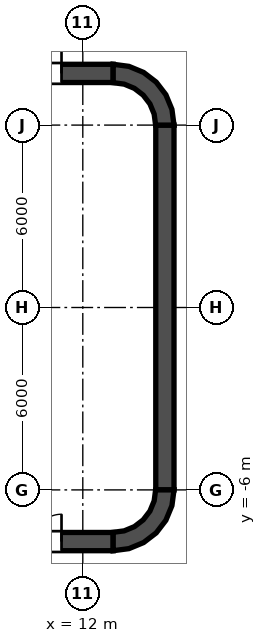
"""IFC4 building model, lengths in metres.
Left out: names, types, materials, properties, quantities, classifications, styles, units other than length and angle.
Written with IfcOpenShell. Run it as: python <this file> out.ifc"""

import sys

from ifc_helpers import new_model, si_unit, direction, frame, frame_2d, origin, place, context, subcontext, project, spatial, polyline, rectangle, outline, extrude, element, fill, save


model = new_model("IFC4")
c1 = context("Model", 3, precision=1e-05, world=origin(), true_north=direction((0.0, 1.0)))
c2 = subcontext(c1, "Body", "Model", "MODEL_VIEW")
j1 = project(units=[si_unit("LENGTHUNIT", "METRE"), si_unit("PLANEANGLEUNIT", "RADIAN")], contexts=[c1])
p1 = place(None, origin())
s1 = spatial("IfcSite", under=j1, at=p1, CompositionType="ELEMENT")
p2 = place(p1, origin())
s2 = spatial("IfcBuilding", under=s1, at=p2, CompositionType="ELEMENT")
p3 = place(p2, origin())
s3 = spatial("IfcBuildingStorey", under=s2, at=p3, CompositionType="ELEMENT", Elevation=0.0)
p4 = place(p3, frame((-13.0, 7.7, 0.0), z_axis=(0.0, 0.0, 1.0), x_axis=(1.0, 0.0, 0.0)))
e1 = element("IfcWall", 1, at=p4, inside=s3, PredefinedType="SHEAR", context=c2, shape_type="SweptSolid", body=[
    extrude(rectangle(XDim=26.0, YDim=0.6, at=frame_2d((13.0, 0.0))), origin(), (0.0, 0.0, 1.0), 8.0),
])
p5 = place(p4, frame((1.7, 0.0, 0.0)))
e2 = element("IfcOpeningElement", 2, at=p5, cuts=e1, PredefinedType="OPENING", context=c2, shape_type="SweptSolid", body=[
    extrude(rectangle(XDim=1.8, YDim=2.1, at=frame_2d((0.9, 1.05))), frame((0.0, 0.3, 0.0), z_axis=(0.0, -1.0, 0.0), x_axis=(1.0, 0.0, 0.0)), (0.0, 0.0, 1.0), 0.6),
])
p6 = place(p4, frame((22.5, 0.0, 0.0)))
e3 = element("IfcOpeningElement", 3, at=p6, cuts=e1, PredefinedType="OPENING", context=c2, shape_type="SweptSolid", body=[
    extrude(rectangle(XDim=1.8, YDim=2.1, at=frame_2d((0.9, 1.05))), frame((0.0, 0.3, 0.0), z_axis=(0.0, -1.0, 0.0), x_axis=(1.0, 0.0, 0.0)), (0.0, 0.0, 1.0), 0.6),
])
p7 = place(p3, frame((-13.0, -7.7, 0.0), z_axis=(0.0, 0.0, 1.0), x_axis=(1.0, 0.0, 0.0)))
e4 = element("IfcWall", 4, at=p7, inside=s3, PredefinedType="SHEAR", context=c2, shape_type="SweptSolid", body=[
    extrude(rectangle(XDim=26.0, YDim=0.6, at=frame_2d((13.0, 0.0))), origin(), (0.0, 0.0, 1.0), 8.0),
])
p8 = place(p7, frame((1.7, 0.0, 0.0)))
e5 = element("IfcOpeningElement", 5, at=p8, cuts=e4, PredefinedType="OPENING", context=c2, shape_type="SweptSolid", body=[
    extrude(rectangle(XDim=1.8, YDim=2.1, at=frame_2d((0.9, 1.05))), frame((0.0, 0.3, 0.0), z_axis=(0.0, -1.0, 0.0), x_axis=(1.0, 0.0, 0.0)), (0.0, 0.0, 1.0), 0.6),
])
p9 = place(p7, frame((22.5, 0.0, 0.0)))
e6 = element("IfcOpeningElement", 6, at=p9, cuts=e4, PredefinedType="OPENING", context=c2, shape_type="SweptSolid", body=[
    extrude(rectangle(XDim=1.8, YDim=2.1, at=frame_2d((0.9, 1.05))), frame((0.0, 0.3, 0.0), z_axis=(0.0, -1.0, 0.0), x_axis=(1.0, 0.0, 0.0)), (0.0, 0.0, 1.0), 0.6),
])
p10 = place(p3, frame((14.7, -6.0, 0.0), z_axis=(0.0, 0.0, 1.0), x_axis=(0.0, 1.0, 0.0)))
e7 = element("IfcWall", 7, at=p10, inside=s3, PredefinedType="SHEAR", context=c2, shape_type="SweptSolid", body=[
    extrude(rectangle(XDim=12.0, YDim=0.6, at=frame_2d((6.0, 0.0))), origin(), (0.0, 0.0, 1.0), 8.0),
])
p11 = place(p3, origin())
e8 = element("IfcWall", 8, at=p11, inside=s3, PredefinedType="SHEAR", context=c2, shape_type="SweptSolid", body=[
    extrude(outline(polyline([(13.0, 8.0), (13.0, 7.395), (13.361, 7.347), (13.698, 7.208), (13.986, 6.986), (14.208, 6.698), (14.347, 6.361), (14.395, 6.0), (15.0, 6.0), (14.932, 6.518), (14.732, 7.0), (14.414, 7.414), (14.0, 7.732), (13.518, 7.932), (13.0, 8.0)])), origin(), (0.0, 0.0, 1.0), 8.0),
])
e9 = element("IfcWall", 9, at=p11, inside=s3, PredefinedType="SHEAR", context=c2, shape_type="SweptSolid", body=[
    extrude(outline(polyline([(15.0, -6.0), (14.395, -6.0), (14.347, -6.361), (14.208, -6.698), (13.986, -6.986), (13.698, -7.208), (13.361, -7.347), (13.0, -7.395), (13.0, -8.0), (13.518, -7.932), (14.0, -7.732), (14.414, -7.414), (14.732, -7.0), (14.932, -6.518), (15.0, -6.0)])), origin(), (0.0, 0.0, 1.0), 8.0),
])
p12 = place(p3, frame((11.8, -7.4, 0.0), z_axis=(0.0, 0.0, 1.0), x_axis=(0.0, 1.0, 0.0)))
e10 = element("IfcWall", 10, at=p12, inside=s3, PredefinedType="SOLIDWALL", context=c2, shape_type="SweptSolid", body=[
    extrude(rectangle(XDim=14.8, YDim=0.4, at=frame_2d((7.4, 0.0))), origin(), (0.0, 0.0, 1.0), 7.8),
])
p13 = place(p12, frame((11.2, 0.0, 0.0)))
e11 = element("IfcOpeningElement", 11, at=p13, cuts=e10, PredefinedType="OPENING", context=c2, shape_type="SweptSolid", body=[
    extrude(rectangle(XDim=1.1, YDim=2.1, at=frame_2d((0.55, 1.05))), frame((0.0, 0.2, 0.0), z_axis=(0.0, -1.0, 0.0), x_axis=(1.0, 0.0, 0.0)), (0.0, 0.0, 1.0), 0.4),
])
p14 = place(p12, frame((8.3, 0.0, 0.0)))
e12 = element("IfcOpeningElement", 12, at=p14, cuts=e10, PredefinedType="OPENING", context=c2, shape_type="SweptSolid", body=[
    extrude(rectangle(XDim=1.1, YDim=2.1, at=frame_2d((0.55, 1.05))), frame((0.0, 0.2, 0.0), z_axis=(0.0, -1.0, 0.0), x_axis=(1.0, 0.0, 0.0)), (0.0, 0.0, 1.0), 0.4),
])
p15 = place(p12, frame((5.4, 0.0, 0.0)))
e13 = element("IfcOpeningElement", 13, at=p15, cuts=e10, PredefinedType="OPENING", context=c2, shape_type="SweptSolid", body=[
    extrude(rectangle(XDim=1.1, YDim=2.1, at=frame_2d((0.55, 1.05))), frame((0.0, 0.2, 0.0), z_axis=(0.0, -1.0, 0.0), x_axis=(1.0, 0.0, 0.0)), (0.0, 0.0, 1.0), 0.4),
])
p16 = place(p12, frame((2.5, 0.0, 0.0)))
e14 = element("IfcOpeningElement", 14, at=p16, cuts=e10, PredefinedType="OPENING", context=c2, shape_type="SweptSolid", body=[
    extrude(rectangle(XDim=1.1, YDim=2.1, at=frame_2d((0.55, 1.05))), frame((0.0, 0.2, 0.0), z_axis=(0.0, -1.0, 0.0), x_axis=(1.0, 0.0, 0.0)), (0.0, 0.0, 1.0), 0.4),
])
p17 = place(p12, frame((13.552, 0.0, 0.0)))
e15 = element("IfcOpeningElement", 15, at=p17, cuts=e10, PredefinedType="OPENING", context=c2, shape_type="SweptSolid", body=[
    extrude(rectangle(XDim=0.9, YDim=2.1, at=frame_2d((0.45, 1.05))), frame((0.0, 0.2, 0.0), z_axis=(0.0, -1.0, 0.0), x_axis=(1.0, 0.0, 0.0)), (0.0, 0.0, 1.0), 0.4),
])
p18 = place(p12, frame((0.347, 0.0, 0.0)))
e16 = element("IfcOpeningElement", 16, at=p18, cuts=e10, PredefinedType="OPENING", context=c2, shape_type="SweptSolid", body=[
    extrude(rectangle(XDim=0.9, YDim=2.1, at=frame_2d((0.45, 1.05))), frame((0.0, 0.2, 0.0), z_axis=(0.0, -1.0, 0.0), x_axis=(1.0, 0.0, 0.0)), (0.0, 0.0, 1.0), 0.4),
])
e17 = element("IfcWall", 17, at=p11, inside=s3, PredefinedType="SOLIDWALL", context=c2, shape_type="SweptSolid", body=[
    extrude(outline(polyline([(12.0, -5.675), (12.0, -5.925), (14.15, -5.925), (14.4, -5.925), (14.4, -5.675), (14.4, -3.025), (14.4, -2.775), (14.4, -0.125), (14.4, 0.125), (14.4, 2.775), (14.4, 3.025), (14.4, 5.675), (14.4, 5.925), (14.15, 5.925), (12.0, 5.925), (12.0, 5.675), (14.15, 5.675), (14.15, 3.025), (12.0, 3.025), (12.0, 2.775), (14.15, 2.775), (14.15, 0.125), (12.0, 0.125), (12.0, -0.125), (14.15, -0.125), (14.15, -2.775), (12.0, -2.775), (12.0, -3.025), (14.15, -3.025), (14.15, -5.675), (12.0, -5.675)])), origin(), (0.0, 0.0, 1.0), 7.8),
])
p19 = place(p13, origin())
e18 = element("IfcDoor", 18, at=p19, inside=s3, OperationType="DOUBLE_DOOR_SLIDING", PredefinedType="DOOR", context=c2, shape_type="SweptSolid", body=[
    extrude(rectangle(XDim=1.1, YDim=2.1, at=frame_2d((0.55, 1.05))), frame((0.0, 0.025, 0.0), z_axis=(0.0, -1.0, 0.0), x_axis=(1.0, 0.0, 0.0)), (0.0, 0.0, 1.0), 0.05),
])
fill(e11, e18)
p20 = place(p14, origin())
e19 = element("IfcDoor", 19, at=p20, inside=s3, OperationType="DOUBLE_DOOR_SLIDING", PredefinedType="DOOR", context=c2, shape_type="SweptSolid", body=[
    extrude(rectangle(XDim=1.1, YDim=2.1, at=frame_2d((0.55, 1.05))), frame((0.0, 0.025, 0.0), z_axis=(0.0, -1.0, 0.0), x_axis=(1.0, 0.0, 0.0)), (0.0, 0.0, 1.0), 0.05),
])
fill(e12, e19)
p21 = place(p15, origin())
e20 = element("IfcDoor", 20, at=p21, inside=s3, OperationType="DOUBLE_DOOR_SLIDING", PredefinedType="DOOR", context=c2, shape_type="SweptSolid", body=[
    extrude(rectangle(XDim=1.1, YDim=2.1, at=frame_2d((0.55, 1.05))), frame((0.0, 0.025, 0.0), z_axis=(0.0, -1.0, 0.0), x_axis=(1.0, 0.0, 0.0)), (0.0, 0.0, 1.0), 0.05),
])
fill(e13, e20)
p22 = place(p16, origin())
e21 = element("IfcDoor", 21, at=p22, inside=s3, OperationType="DOUBLE_DOOR_SLIDING", PredefinedType="DOOR", context=c2, shape_type="SweptSolid", body=[
    extrude(rectangle(XDim=1.1, YDim=2.1, at=frame_2d((0.55, 1.05))), frame((0.0, 0.025, 0.0), z_axis=(0.0, -1.0, 0.0), x_axis=(1.0, 0.0, 0.0)), (0.0, 0.0, 1.0), 0.05),
])
fill(e14, e21)
p23 = place(p17, origin())
e22 = element("IfcDoor", 22, at=p23, inside=s3, OperationType="SINGLE_SWING_RIGHT", PredefinedType="DOOR", context=c2, shape_type="SweptSolid", body=[
    extrude(rectangle(XDim=0.9, YDim=2.1, at=frame_2d((0.45, 1.05))), frame((0.0, 0.025, 0.0), z_axis=(0.0, -1.0, 0.0), x_axis=(1.0, 0.0, 0.0)), (0.0, 0.0, 1.0), 0.05),
])
fill(e15, e22)
p24 = place(p18, origin())
e23 = element("IfcDoor", 23, at=p24, inside=s3, OperationType="SINGLE_SWING_RIGHT", PredefinedType="DOOR", context=c2, shape_type="SweptSolid", body=[
    extrude(rectangle(XDim=0.9, YDim=2.1, at=frame_2d((0.45, 1.05))), frame((0.0, 0.025, 0.0), z_axis=(0.0, -1.0, 0.0), x_axis=(1.0, 0.0, 0.0)), (0.0, 0.0, 1.0), 0.05),
])
fill(e16, e23)
p25 = place(p6, origin())
e24 = element("IfcDoor", 24, at=p25, inside=s3, OperationType="DOUBLE_DOOR_SINGLE_SWING", PredefinedType="DOOR", context=c2, shape_type="SweptSolid", body=[
    extrude(rectangle(XDim=1.8, YDim=2.1, at=frame_2d((0.9, 1.05))), frame((0.0, 0.025, 0.0), z_axis=(0.0, -1.0, 0.0), x_axis=(1.0, 0.0, 0.0)), (0.0, 0.0, 1.0), 0.05),
])
fill(e3, e24)
p26 = place(p9, origin())
e25 = element("IfcDoor", 25, at=p26, inside=s3, OperationType="DOUBLE_DOOR_SINGLE_SWING", PredefinedType="DOOR", context=c2, shape_type="SweptSolid", body=[
    extrude(rectangle(XDim=1.8, YDim=2.1, at=frame_2d((0.9, 1.05))), frame((0.0, 0.025, 0.0), z_axis=(0.0, -1.0, 0.0), x_axis=(1.0, 0.0, 0.0)), (0.0, 0.0, 1.0), 0.05),
])
fill(e6, e25)
save(model, sys.argv[1])
